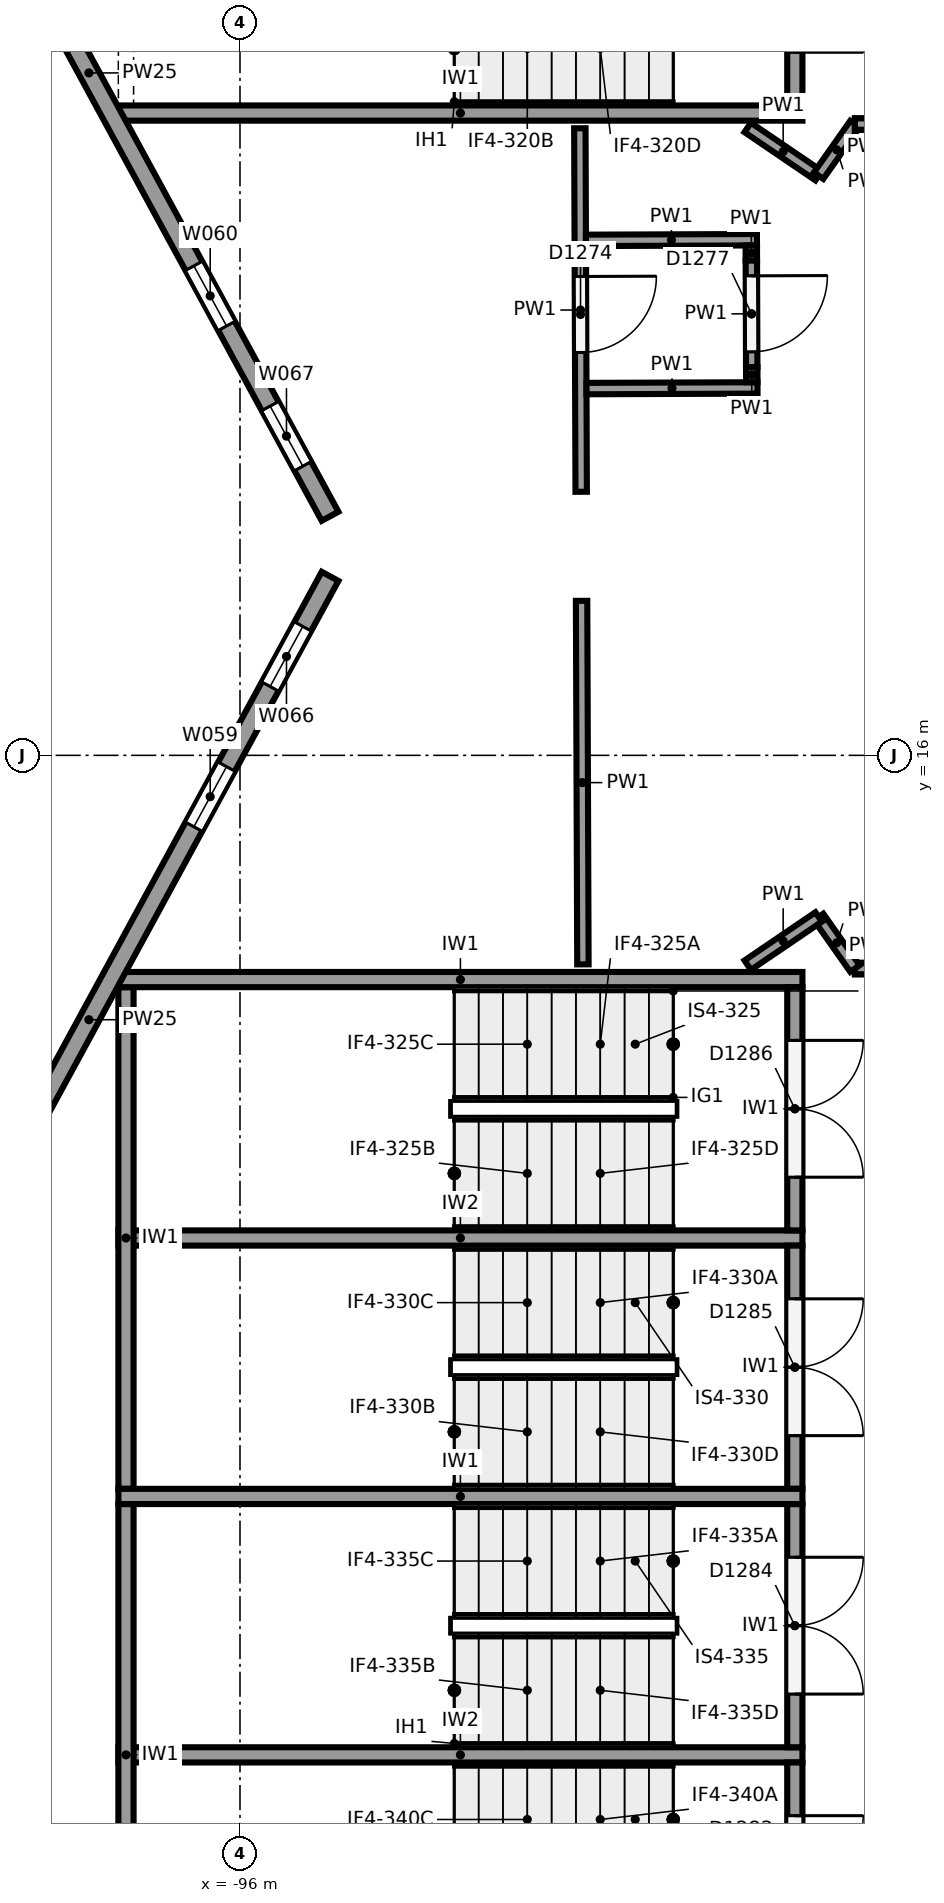
"""IFC4 building model, lengths in metres.
Left out: names, types, materials, properties, quantities, classifications, styles, units other than length and angle.
Written with IfcOpenShell. Run it as: python <this file> out.ifc"""

import sys

from ifc_helpers import new_model, si_unit, direction, frame, frame_2d, origin, origin_2d, place, context, subcontext, project, spatial, rectangle, circle, extrude, element, fill, save


model = new_model("IFC4")
c1 = context("Model", 3, precision=1e-05, world=origin(), true_north=direction((0.0, 1.0)))
c2 = subcontext(c1, "Body", "Model", "MODEL_VIEW")
j1 = project(units=[si_unit("LENGTHUNIT", "METRE"), si_unit("PLANEANGLEUNIT", "RADIAN")], contexts=[c1])
p1 = place(None, origin())
s1 = spatial("IfcSite", under=j1, at=p1, CompositionType="ELEMENT")
p2 = place(p1, origin())
s2 = spatial("IfcBuilding", under=s1, at=p2, CompositionType="ELEMENT")
p3 = place(p2, frame((0.0, 0.0, 18.0)))
s3 = spatial("IfcBuildingStorey", under=s2, at=p3, CompositionType="ELEMENT", Elevation=18.0)
p4 = place(p3, frame((-94.6, 18.75, 0.0), z_axis=(0.0, 0.0, 1.0), x_axis=(1.0, 0.0, 0.0)))
e1 = element("IfcColumn", 1, at=p4, inside=s3, PredefinedType="COLUMN", context=c2, shape_type="SweptSolid", body=[
    extrude(circle(Radius=0.45, at=origin_2d()), origin(), (0.0, 0.0, 1.0), 6.0),
])
p5 = place(p3, frame((-94.815, 19.145, 0.0), z_axis=(0.0, 0.0, 1.0), x_axis=(-0.477867771117, 0.878431780691, 0.0)))
e2 = element("IfcWall", 2, at=p5, inside=s3, PredefinedType="SOLIDWALL", context=c2, shape_type="SweptSolid", body=[
    extrude(rectangle(XDim=13.28, YDim=0.25, at=frame_2d((6.64, 0.0))), origin(), (0.0, 0.0, 1.0), 4.3),
])
p6 = place(p5, frame((0.75, 0.0, 1.0)))
e3 = element("IfcOpeningElement", 3, at=p6, cuts=e2, PredefinedType="OPENING", context=c2, shape_type="SweptSolid", body=[
    extrude(rectangle(XDim=0.9, YDim=3.25, at=frame_2d((0.45, 1.625))), frame((0.0, 0.135, 0.0), z_axis=(0.0, -1.0, 0.0), x_axis=(1.0, 0.0, 0.0)), (0.0, 0.0, 1.0), 0.27),
])
p7 = place(p5, frame((2.85, 0.0, 1.0)))
e4 = element("IfcOpeningElement", 4, at=p7, cuts=e2, PredefinedType="OPENING", context=c2, shape_type="SweptSolid", body=[
    extrude(rectangle(XDim=0.9, YDim=3.25, at=frame_2d((0.45, 1.625))), frame((0.0, 0.135, 0.0), z_axis=(0.0, -1.0, 0.0), x_axis=(1.0, 0.0, 0.0)), (0.0, 0.0, 1.0), 0.27),
])
p8 = place(p5, frame((11.25, 0.0, 1.0)))
e5 = element("IfcOpeningElement", 5, at=p8, cuts=e2, PredefinedType="OPENING", context=c2, shape_type="SweptSolid", body=[
    extrude(rectangle(XDim=0.9, YDim=3.25, at=frame_2d((0.45, 1.625))), frame((0.0, 0.135, 0.0), z_axis=(0.0, -1.0, 0.0), x_axis=(1.0, 0.0, 0.0)), (0.0, 0.0, 1.0), 0.27),
])
p9 = place(p3, frame((-101.161, 6.689, 0.0), z_axis=(0.0, 0.0, 1.0), x_axis=(0.477867771117, 0.878431780691, 0.0)))
e6 = element("IfcWall", 6, at=p9, inside=s3, PredefinedType="SOLIDWALL", context=c2, shape_type="SweptSolid", body=[
    extrude(rectangle(XDim=13.28, YDim=0.25, at=frame_2d((6.64, 0.0))), origin(), (0.0, 0.0, 1.0), 4.3),
])
p10 = place(p9, frame((11.63, 0.0, 1.0)))
e7 = element("IfcOpeningElement", 7, at=p10, cuts=e6, PredefinedType="OPENING", context=c2, shape_type="SweptSolid", body=[
    extrude(rectangle(XDim=0.9, YDim=3.25, at=frame_2d((0.45, 1.625))), frame((0.0, 0.135, 0.0), z_axis=(0.0, -1.0, 0.0), x_axis=(1.0, 0.0, 0.0)), (0.0, 0.0, 1.0), 0.27),
])
p11 = place(p9, frame((9.53, 0.0, 1.0)))
e8 = element("IfcOpeningElement", 8, at=p11, cuts=e6, PredefinedType="OPENING", context=c2, shape_type="SweptSolid", body=[
    extrude(rectangle(XDim=0.9, YDim=3.25, at=frame_2d((0.45, 1.625))), frame((0.0, 0.135, 0.0), z_axis=(0.0, -1.0, 0.0), x_axis=(1.0, 0.0, 0.0)), (0.0, 0.0, 1.0), 0.27),
])
p12 = place(p9, frame((1.13, 0.0, 1.0)))
e9 = element("IfcOpeningElement", 9, at=p12, cuts=e6, PredefinedType="OPENING", context=c2, shape_type="SweptSolid", body=[
    extrude(rectangle(XDim=0.9, YDim=3.25, at=frame_2d((0.45, 1.625))), frame((0.0, 0.135, 0.0), z_axis=(0.0, -1.0, 0.0), x_axis=(1.0, 0.0, 0.0)), (0.0, 0.0, 1.0), 0.27),
])
p13 = place(p3, frame((-94.815, -5.855, 0.0), z_axis=(0.0, 0.0, 1.0), x_axis=(-0.477867771117, 0.878431780691, 0.0)))
e10 = element("IfcWall", 10, at=p13, inside=s3, PredefinedType="SOLIDWALL", context=c2, shape_type="SweptSolid", body=[
    extrude(rectangle(XDim=13.28, YDim=0.25, at=frame_2d((6.64, 0.0))), origin(), (0.0, 0.0, 1.0), 4.3),
])
p14 = place(p13, frame((0.75, 0.0, 1.0)))
e11 = element("IfcOpeningElement", 11, at=p14, cuts=e10, PredefinedType="OPENING", context=c2, shape_type="SweptSolid", body=[
    extrude(rectangle(XDim=0.9, YDim=3.25, at=frame_2d((0.45, 1.625))), frame((0.0, 0.135, 0.0), z_axis=(0.0, -1.0, 0.0), x_axis=(1.0, 0.0, 0.0)), (0.0, 0.0, 1.0), 0.27),
])
p15 = place(p13, frame((2.85, 0.0, 1.0)))
e12 = element("IfcOpeningElement", 12, at=p15, cuts=e10, PredefinedType="OPENING", context=c2, shape_type="SweptSolid", body=[
    extrude(rectangle(XDim=0.9, YDim=3.25, at=frame_2d((0.45, 1.625))), frame((0.0, 0.135, 0.0), z_axis=(0.0, -1.0, 0.0), x_axis=(1.0, 0.0, 0.0)), (0.0, 0.0, 1.0), 0.27),
])
p16 = place(p13, frame((11.25, 0.0, 1.0)))
e13 = element("IfcOpeningElement", 13, at=p16, cuts=e10, PredefinedType="OPENING", context=c2, shape_type="SweptSolid", body=[
    extrude(rectangle(XDim=0.9, YDim=3.25, at=frame_2d((0.45, 1.625))), frame((0.0, 0.135, 0.0), z_axis=(0.0, -1.0, 0.0), x_axis=(1.0, 0.0, 0.0)), (0.0, 0.0, 1.0), 0.27),
])
p17 = place(p3, frame((-97.6, 24.45, 0.0), z_axis=(0.0, 0.0, 1.0), x_axis=(1.0, 0.0, 0.0)))
e14 = element("IfcWall", 14, at=p17, inside=s3, PredefinedType="SHEAR", context=c2, shape_type="SweptSolid", body=[
    extrude(rectangle(XDim=9.0, YDim=0.2, at=frame_2d((4.5, 0.0))), origin(), (0.0, 0.0, 1.0), 5.6),
])
p18 = place(p3, frame((-97.5, 31.15, 0.0), z_axis=(0.0, 0.0, 1.0), x_axis=(0.0, -1.0, 0.0)))
e15 = element("IfcWall", 15, at=p18, inside=s3, PredefinedType="SHEAR", context=c2, shape_type="SweptSolid", body=[
    extrude(rectangle(XDim=6.6, YDim=0.2, at=frame_2d((3.3, 0.0))), origin(), (0.0, 0.0, 1.0), 5.6),
])
p19 = place(p3, frame((-88.7, 27.75, 0.0), z_axis=(0.0, 0.0, 1.0), x_axis=(0.0, -1.0, 0.0)))
e16 = element("IfcWall", 16, at=p19, inside=s3, PredefinedType="SHEAR", context=c2, shape_type="SweptSolid", body=[
    extrude(rectangle(XDim=3.2, YDim=0.2, at=frame_2d((1.6, 0.0))), origin(), (0.0, 0.0, 1.0), 5.6),
])
p20 = place(p19, frame((0.7, 0.0, 0.0)))
e17 = element("IfcOpeningElement", 17, at=p20, cuts=e16, PredefinedType="OPENING", context=c2, shape_type="SweptSolid", body=[
    extrude(rectangle(XDim=1.8, YDim=2.1, at=frame_2d((0.9, 1.05))), frame((0.0, 0.11, 0.0), z_axis=(0.0, -1.0, 0.0), x_axis=(1.0, 0.0, 0.0)), (0.0, 0.0, 1.0), 0.22),
])
for number, where, z_axis, x_axis in (
    (18, (-97.6, 13.05, 0.0), (0.0, 0.0, 1.0), (1.0, 0.0, 0.0)),
    (19, (-97.6, 6.25, 0.0), (0.0, 0.0, 1.0), (1.0, 0.0, 0.0)),
):
    element("IfcWall", number, at=place(p3, frame(where, z_axis=z_axis, x_axis=x_axis)), inside=s3, PredefinedType="SHEAR", context=c2, shape_type="SweptSolid", body=[
        extrude(rectangle(XDim=9.0, YDim=0.2, at=frame_2d((4.5, 0.0))), origin(), (0.0, 0.0, 1.0), 5.6),
    ])
for number, where, z_axis, x_axis in (
    (20, (-97.5, 12.95, 0.0), (0.0, 0.0, 1.0), (0.0, -1.0, 0.0)),
    (21, (-97.5, 6.15, 0.0), (0.0, 0.0, 1.0), (0.0, -1.0, 0.0)),
):
    element("IfcWall", number, at=place(p3, frame(where, z_axis=z_axis, x_axis=x_axis)), inside=s3, PredefinedType="SHEAR", context=c2, shape_type="SweptSolid", body=[
        extrude(rectangle(XDim=6.6, YDim=0.2, at=frame_2d((3.3, 0.0))), origin(), (0.0, 0.0, 1.0), 5.6),
    ])
for number, where, z_axis, x_axis in (
    (22, (-97.6, 9.65, 0.0), (0.0, 0.0, 1.0), (1.0, 0.0, 0.0)),
    (23, (-97.6, 2.85, 0.0), (0.0, 0.0, 1.0), (1.0, 0.0, 0.0)),
):
    element("IfcWall", number, at=place(p3, frame(where, z_axis=z_axis, x_axis=x_axis)), inside=s3, PredefinedType="SHEAR", context=c2, shape_type="SweptSolid", body=[
        extrude(rectangle(XDim=9.0, YDim=0.2, at=frame_2d((4.5, 0.0))), origin(), (0.0, 0.0, 1.0), 5.6),
    ])
p21 = place(p3, frame((-88.7, 12.95, 0.0), z_axis=(0.0, 0.0, 1.0), x_axis=(0.0, -1.0, 0.0)))
e24 = element("IfcWall", 24, at=p21, inside=s3, PredefinedType="SHEAR", context=c2, shape_type="SweptSolid", body=[
    extrude(rectangle(XDim=3.2, YDim=0.2, at=frame_2d((1.6, 0.0))), origin(), (0.0, 0.0, 1.0), 5.6),
])
p22 = place(p21, frame((0.7, 0.0, 0.0)))
e25 = element("IfcOpeningElement", 25, at=p22, cuts=e24, PredefinedType="OPENING", context=c2, shape_type="SweptSolid", body=[
    extrude(rectangle(XDim=1.8, YDim=2.1, at=frame_2d((0.9, 1.05))), frame((0.0, 0.11, 0.0), z_axis=(0.0, -1.0, 0.0), x_axis=(1.0, 0.0, 0.0)), (0.0, 0.0, 1.0), 0.22),
])
p23 = place(p3, frame((-88.7, 9.55, 0.0), z_axis=(0.0, 0.0, 1.0), x_axis=(0.0, -1.0, 0.0)))
e26 = element("IfcWall", 26, at=p23, inside=s3, PredefinedType="SHEAR", context=c2, shape_type="SweptSolid", body=[
    extrude(rectangle(XDim=3.2, YDim=0.2, at=frame_2d((1.6, 0.0))), origin(), (0.0, 0.0, 1.0), 5.6),
])
p24 = place(p23, frame((0.7, 0.0, 0.0)))
e27 = element("IfcOpeningElement", 27, at=p24, cuts=e26, PredefinedType="OPENING", context=c2, shape_type="SweptSolid", body=[
    extrude(rectangle(XDim=1.8, YDim=2.1, at=frame_2d((0.9, 1.05))), frame((0.0, 0.11, 0.0), z_axis=(0.0, -1.0, 0.0), x_axis=(1.0, 0.0, 0.0)), (0.0, 0.0, 1.0), 0.22),
])
p25 = place(p3, frame((-88.7, 6.15, 0.0), z_axis=(0.0, 0.0, 1.0), x_axis=(0.0, -1.0, 0.0)))
e28 = element("IfcWall", 28, at=p25, inside=s3, PredefinedType="SHEAR", context=c2, shape_type="SweptSolid", body=[
    extrude(rectangle(XDim=3.2, YDim=0.2, at=frame_2d((1.6, 0.0))), origin(), (0.0, 0.0, 1.0), 5.6),
])
p26 = place(p25, frame((0.7, 0.0, 0.0)))
e29 = element("IfcOpeningElement", 29, at=p26, cuts=e28, PredefinedType="OPENING", context=c2, shape_type="SweptSolid", body=[
    extrude(rectangle(XDim=1.8, YDim=2.1, at=frame_2d((0.9, 1.05))), frame((0.0, 0.11, 0.0), z_axis=(0.0, -1.0, 0.0), x_axis=(1.0, 0.0, 0.0)), (0.0, 0.0, 1.0), 0.22),
])
p27 = place(p3, frame((-88.7, 2.75, 0.0), z_axis=(0.0, 0.0, 1.0), x_axis=(0.0, -1.0, 0.0)))
e30 = element("IfcWall", 30, at=p27, inside=s3, PredefinedType="SHEAR", context=c2, shape_type="SweptSolid", body=[
    extrude(rectangle(XDim=3.2, YDim=0.2, at=frame_2d((1.6, 0.0))), origin(), (0.0, 0.0, 1.0), 5.6),
])
p28 = place(p27, frame((0.7, 0.0, 0.0)))
e31 = element("IfcOpeningElement", 31, at=p28, cuts=e30, PredefinedType="OPENING", context=c2, shape_type="SweptSolid", body=[
    extrude(rectangle(XDim=1.8, YDim=2.1, at=frame_2d((0.9, 1.05))), frame((0.0, 0.11, 0.0), z_axis=(0.0, -1.0, 0.0), x_axis=(1.0, 0.0, 0.0)), (0.0, 0.0, 1.0), 0.22),
])
p29 = place(p3, frame((-91.529, 24.25, 0.0), z_axis=(0.0, 0.0, 1.0), x_axis=(0.00367531974, -0.99999324599, 0.0)))
e32 = element("IfcWall", 32, at=p29, inside=s3, PredefinedType="PARTITIONING", context=c2, shape_type="SweptSolid", body=[
    extrude(rectangle(XDim=4.783, YDim=0.15, at=frame_2d((2.391, 0.0))), origin(), (0.0, 0.0, 1.0), 5.6),
])
p30 = place(p29, frame((1.95, 0.0, 0.0)))
e33 = element("IfcOpeningElement", 33, at=p30, cuts=e32, PredefinedType="OPENING", context=c2, shape_type="SweptSolid", body=[
    extrude(rectangle(XDim=1.0, YDim=2.1, at=frame_2d((0.5, 1.05))), frame((0.0, 0.085, 0.0), z_axis=(0.0, -1.0, 0.0), x_axis=(1.0, 0.0, 0.0)), (0.0, 0.0, 1.0), 0.17),
])
p31 = place(p3, frame((-91.506, 18.033, 0.0), z_axis=(0.0, 0.0, 1.0), x_axis=(0.003624274308, -0.999993432296, 0.0)))
e34 = element("IfcWall", 34, at=p31, inside=s3, PredefinedType="PARTITIONING", context=c2, shape_type="SweptSolid", body=[
    extrude(rectangle(XDim=4.783, YDim=0.15, at=frame_2d((2.391, 0.0))), origin(), (0.0, 0.0, 1.0), 5.6),
])
p32 = place(p3, frame((-89.32, 24.26, 0.0), z_axis=(0.0, 0.0, 1.0), x_axis=(0.827055308354, -0.562120553728, 0.0)))
e35 = element("IfcWall", 35, at=p32, inside=s3, PredefinedType="PARTITIONING", context=c2, shape_type="SweptSolid", body=[
    extrude(rectangle(XDim=1.128, YDim=0.15, at=frame_2d((0.564, 0.0))), origin(), (0.0, 0.0, 1.0), 5.6),
])
p33 = place(p3, frame((-88.387, 23.626, 0.0), z_axis=(0.0, 0.0, 1.0), x_axis=(0.575376756214, 0.817888493872, 0.0)))
e36 = element("IfcWall", 36, at=p33, inside=s3, PredefinedType="PARTITIONING", context=c2, shape_type="SweptSolid", body=[
    extrude(rectangle(XDim=0.83, YDim=0.15, at=frame_2d((0.415, 0.0))), origin(), (0.0, 0.0, 1.0), 5.6),
])
p34 = place(p3, frame((-87.909, 24.305, 0.0), z_axis=(0.0, 0.0, 1.0), x_axis=(1.0, 0.0, 0.0)))
e37 = element("IfcWall", 37, at=p34, inside=s3, PredefinedType="PARTITIONING", context=c2, shape_type="SweptSolid", body=[
    extrude(rectangle(XDim=3.704, YDim=0.15, at=frame_2d((1.852, 0.0))), origin(), (0.0, 0.0, 1.0), 4.5),
])
p35 = place(p34, frame((0.65, 0.0, 0.0)))
e38 = element("IfcOpeningElement", 38, at=p35, cuts=e37, PredefinedType="OPENING", context=c2, shape_type="SweptSolid", body=[
    extrude(rectangle(XDim=1.8, YDim=2.1, at=frame_2d((0.9, 1.05))), frame((0.0, 0.085, 0.0), z_axis=(0.0, -1.0, 0.0), x_axis=(1.0, 0.0, 0.0)), (0.0, 0.0, 1.0), 0.17),
])
p36 = place(p3, frame((-87.909, 24.305, 4.5), z_axis=(0.0, 0.0, 1.0), x_axis=(1.0, 0.0, 0.0)))
e39 = element("IfcWall", 39, at=p36, inside=s3, PredefinedType="PARTITIONING", context=c2, shape_type="SweptSolid", body=[
    extrude(rectangle(XDim=0.6, YDim=0.15, at=frame_2d((0.3, 0.0))), origin(), (0.0, 0.0, 1.0), 1.1),
])
p37 = place(p3, frame((-81.555, 13.195, 0.0), z_axis=(0.0, 0.0, 1.0), x_axis=(-1.0, 0.0, 0.0)))
e40 = element("IfcWall", 40, at=p37, inside=s3, PredefinedType="PARTITIONING", context=c2, shape_type="SweptSolid", body=[
    extrude(rectangle(XDim=6.354, YDim=0.15, at=frame_2d((3.177, 0.0))), origin(), (0.0, 0.0, 1.0), 4.5),
])
p38 = place(p37, frame((3.85, 0.0, 0.0)))
e41 = element("IfcOpeningElement", 41, at=p38, cuts=e40, PredefinedType="OPENING", context=c2, shape_type="SweptSolid", body=[
    extrude(rectangle(XDim=1.8, YDim=2.1, at=frame_2d((0.9, 1.05))), frame((0.0, 0.085, 0.0), z_axis=(0.0, -1.0, 0.0), x_axis=(1.0, 0.0, 0.0)), (0.0, 0.0, 1.0), 0.17),
])
p39 = place(p3, frame((-87.255, 13.195, 4.5), z_axis=(0.0, 0.0, 1.0), x_axis=(-1.0, 0.0, 0.0)))
e42 = element("IfcWall", 42, at=p39, inside=s3, PredefinedType="PARTITIONING", context=c2, shape_type="SweptSolid", body=[
    extrude(rectangle(XDim=0.654, YDim=0.15, at=frame_2d((0.327, 0.0))), origin(), (0.0, 0.0, 1.0), 1.1),
])
p40 = place(p3, frame((-87.909, 13.195, 0.0), z_axis=(0.0, 0.0, 1.0), x_axis=(-0.575573582652, 0.81774999294, 0.0)))
e43 = element("IfcWall", 43, at=p40, inside=s3, PredefinedType="PARTITIONING", context=c2, shape_type="SweptSolid", body=[
    extrude(rectangle(XDim=0.83, YDim=0.15, at=frame_2d((0.415, 0.0))), origin(), (0.0, 0.0, 1.0), 5.6),
])
p41 = place(p3, frame((-88.387, 13.874, 0.0), z_axis=(0.0, 0.0, 1.0), x_axis=(-0.827055308354, -0.562120553728, 0.0)))
e44 = element("IfcWall", 44, at=p41, inside=s3, PredefinedType="PARTITIONING", context=c2, shape_type="SweptSolid", body=[
    extrude(rectangle(XDim=1.128, YDim=0.15, at=frame_2d((0.564, 0.0))), origin(), (0.0, 0.0, 1.0), 5.6),
])
for number, where, z_axis, x_axis in (
    (45, (-91.448, 22.775, 0.0), (0.0, 0.0, 1.0), (1.0, 0.004, 0.0)),
    (46, (-91.441, 20.825, 0.0), (0.0, 0.0, 1.0), (1.0, 0.004, 0.0)),
):
    element("IfcWall", number, at=place(p3, frame(where, z_axis=z_axis, x_axis=x_axis)), inside=s3, PredefinedType="PARTITIONING", context=c2, shape_type="SweptSolid", body=[
        extrude(rectangle(XDim=2.25, YDim=0.15, at=frame_2d((1.125, 0.0))), origin(), (0.0, 0.0, 1.0), 5.6),
    ])
p42 = place(p3, frame((-89.273, 22.708, 0.0), z_axis=(0.0, 0.0, 1.0), x_axis=(0.003662979089, -0.99999329127, 0.0)))
e47 = element("IfcWall", 47, at=p42, inside=s3, PredefinedType="PARTITIONING", context=c2, shape_type="SweptSolid", body=[
    extrude(rectangle(XDim=0.2, YDim=0.15, at=frame_2d((0.1, 0.0))), origin(), (0.0, 0.0, 1.0), 5.6),
])
p43 = place(p3, frame((-89.272, 22.508, 0.0), z_axis=(0.0, 0.0, 1.0), x_axis=(0.00366234028, -0.999993293609, 0.0)))
e48 = element("IfcWall", 48, at=p43, inside=s3, PredefinedType="PARTITIONING", context=c2, shape_type="SweptSolid", body=[
    extrude(rectangle(XDim=1.4, YDim=0.15, at=frame_2d((0.7, 0.0))), origin(), (0.0, 0.0, 1.0), 5.6),
])
p44 = place(p43, frame((0.2, 0.0, 0.0)))
e49 = element("IfcOpeningElement", 49, at=p44, cuts=e48, PredefinedType="OPENING", context=c2, shape_type="SweptSolid", body=[
    extrude(rectangle(XDim=1.0, YDim=2.1, at=frame_2d((0.5, 1.05))), frame((0.0, 0.085, 0.0), z_axis=(0.0, -1.0, 0.0), x_axis=(1.0, 0.0, 0.0)), (0.0, 0.0, 1.0), 0.17),
])
p45 = place(p3, frame((-89.267, 21.108, 0.0), z_axis=(0.0, 0.0, 1.0), x_axis=(0.003658512101, -0.999993307622, 0.0)))
e50 = element("IfcWall", 50, at=p45, inside=s3, PredefinedType="PARTITIONING", context=c2, shape_type="SweptSolid", body=[
    extrude(rectangle(XDim=0.2, YDim=0.15, at=frame_2d((0.1, 0.0))), origin(), (0.0, 0.0, 1.0), 5.6),
])
p46 = place(p6, origin())
e51 = element("IfcWindow", 51, at=p46, inside=s3, PartitioningType="SINGLE_PANEL", PredefinedType="WINDOW", context=c2, shape_type="SweptSolid", body=[
    extrude(rectangle(XDim=0.9, YDim=3.25, at=frame_2d((0.45, 1.625))), frame((0.0, 0.03, 0.0), z_axis=(0.0, -1.0, 0.0), x_axis=(1.0, 0.0, 0.0)), (0.0, 0.0, 1.0), 0.06),
])
fill(e3, e51)
p47 = place(p7, origin())
e52 = element("IfcWindow", 52, at=p47, inside=s3, PartitioningType="SINGLE_PANEL", PredefinedType="WINDOW", context=c2, shape_type="SweptSolid", body=[
    extrude(rectangle(XDim=0.9, YDim=3.25, at=frame_2d((0.45, 1.625))), frame((0.0, 0.03, 0.0), z_axis=(0.0, -1.0, 0.0), x_axis=(1.0, 0.0, 0.0)), (0.0, 0.0, 1.0), 0.06),
])
fill(e4, e52)
p48 = place(p10, origin())
e53 = element("IfcWindow", 53, at=p48, inside=s3, PartitioningType="SINGLE_PANEL", PredefinedType="WINDOW", context=c2, shape_type="SweptSolid", body=[
    extrude(rectangle(XDim=0.9, YDim=3.25, at=frame_2d((0.45, 1.625))), frame((0.0, 0.03, 0.0), z_axis=(0.0, -1.0, 0.0), x_axis=(1.0, 0.0, 0.0)), (0.0, 0.0, 1.0), 0.06),
])
fill(e7, e53)
p49 = place(p11, origin())
e54 = element("IfcWindow", 54, at=p49, inside=s3, PartitioningType="SINGLE_PANEL", PredefinedType="WINDOW", context=c2, shape_type="SweptSolid", body=[
    extrude(rectangle(XDim=0.9, YDim=3.25, at=frame_2d((0.45, 1.625))), frame((0.0, 0.03, 0.0), z_axis=(0.0, -1.0, 0.0), x_axis=(1.0, 0.0, 0.0)), (0.0, 0.0, 1.0), 0.06),
])
fill(e8, e54)
p50 = place(p22, origin())
e55 = element("IfcDoor", 55, at=p50, inside=s3, OperationType="DOUBLE_DOOR_SINGLE_SWING", PredefinedType="DOOR", context=c2, shape_type="SweptSolid", body=[
    extrude(rectangle(XDim=1.8, YDim=2.1, at=frame_2d((0.9, 1.05))), frame((0.0, 0.025, 0.0), z_axis=(0.0, -1.0, 0.0), x_axis=(1.0, 0.0, 0.0)), (0.0, 0.0, 1.0), 0.05),
])
fill(e25, e55)
p51 = place(p24, origin())
e56 = element("IfcDoor", 56, at=p51, inside=s3, OperationType="DOUBLE_DOOR_SINGLE_SWING", PredefinedType="DOOR", context=c2, shape_type="SweptSolid", body=[
    extrude(rectangle(XDim=1.8, YDim=2.1, at=frame_2d((0.9, 1.05))), frame((0.0, 0.025, 0.0), z_axis=(0.0, -1.0, 0.0), x_axis=(1.0, 0.0, 0.0)), (0.0, 0.0, 1.0), 0.05),
])
fill(e27, e56)
p52 = place(p26, origin())
e57 = element("IfcDoor", 57, at=p52, inside=s3, OperationType="DOUBLE_DOOR_SINGLE_SWING", PredefinedType="DOOR", context=c2, shape_type="SweptSolid", body=[
    extrude(rectangle(XDim=1.8, YDim=2.1, at=frame_2d((0.9, 1.05))), frame((0.0, 0.025, 0.0), z_axis=(0.0, -1.0, 0.0), x_axis=(1.0, 0.0, 0.0)), (0.0, 0.0, 1.0), 0.05),
])
fill(e29, e57)
p53 = place(p28, origin())
e58 = element("IfcDoor", 58, at=p53, inside=s3, OperationType="DOUBLE_DOOR_SINGLE_SWING", PredefinedType="DOOR", context=c2, shape_type="SweptSolid", body=[
    extrude(rectangle(XDim=1.8, YDim=2.1, at=frame_2d((0.9, 1.05))), frame((0.0, 0.025, 0.0), z_axis=(0.0, -1.0, 0.0), x_axis=(1.0, 0.0, 0.0)), (0.0, 0.0, 1.0), 0.05),
])
fill(e31, e58)
p54 = place(p30, origin())
e59 = element("IfcDoor", 59, at=p54, inside=s3, OperationType="SINGLE_SWING_LEFT", PredefinedType="DOOR", context=c2, shape_type="SweptSolid", body=[
    extrude(rectangle(XDim=1.0, YDim=2.1, at=frame_2d((0.5, 1.05))), frame((0.0, 0.025, 0.0), z_axis=(0.0, -1.0, 0.0), x_axis=(1.0, 0.0, 0.0)), (0.0, 0.0, 1.0), 0.05),
])
fill(e33, e59)
p55 = place(p44, origin())
e60 = element("IfcDoor", 60, at=p55, inside=s3, OperationType="SINGLE_SWING_LEFT", PredefinedType="DOOR", context=c2, shape_type="SweptSolid", body=[
    extrude(rectangle(XDim=1.0, YDim=2.1, at=frame_2d((0.5, 1.05))), frame((0.0, 0.025, 0.0), z_axis=(0.0, -1.0, 0.0), x_axis=(1.0, 0.0, 0.0)), (0.0, 0.0, 1.0), 0.05),
])
fill(e49, e60)
save(model, sys.argv[1])
